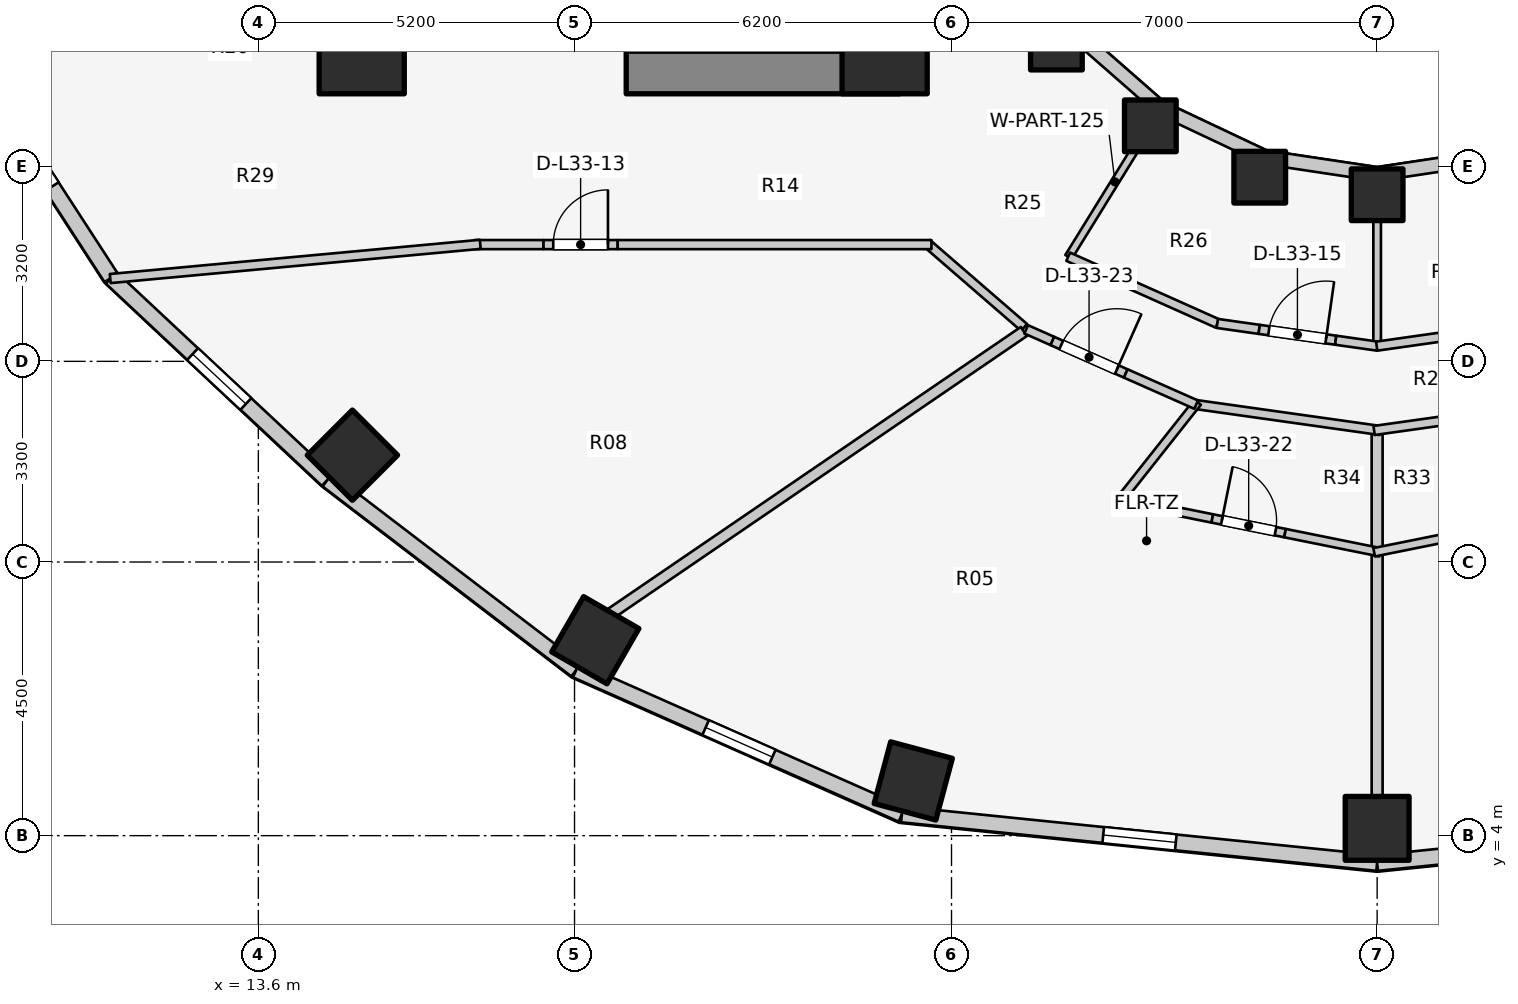
"""IFC4 building model, lengths in metres.
Left out: names, types, materials, properties, quantities, classifications, styles, units other than length and angle.
Written with IfcOpenShell. Run it as: python <this file> out.ifc"""

import sys

from ifc_helpers import new_model, si_unit, direction, frame, frame_2d, origin, origin_2d, place, context, subcontext, project, spatial, rectangle, extrude, element, fill, save


model = new_model("IFC4")
c1 = context("Model", 3, precision=1e-05, world=origin(), true_north=direction((0.0, 1.0)))
c2 = subcontext(c1, "Body", "Model", "MODEL_VIEW")
j1 = project(units=[si_unit("LENGTHUNIT", "METRE"), si_unit("PLANEANGLEUNIT", "RADIAN")], contexts=[c1])
p1 = place(None, origin())
s1 = spatial("IfcSite", under=j1, at=p1, CompositionType="ELEMENT")
p2 = place(p1, origin())
s2 = spatial("IfcBuilding", under=s1, at=p2, CompositionType="ELEMENT")
p3 = place(p2, frame((0.0, 0.0, 110.4)))
s3 = spatial("IfcBuildingStorey", under=s2, at=p3, CompositionType="ELEMENT", Elevation=110.4)
p4 = place(p3, frame((19.65, 16.55, 0.0), z_axis=(0.0, 0.0, 1.0), x_axis=(1.0, 0.0, 0.0)))
e1 = element("IfcWall", 1, at=p4, inside=s3, PredefinedType="SHEAR", context=c2, shape_type="SweptSolid", body=[
    extrude(rectangle(XDim=4.5, YDim=0.7, at=frame_2d((2.25, 0.0))), origin(), (0.0, 0.0, 1.0), 3.1),
])
for number, where, z_axis, x_axis in (
    (2, (15.3, 16.9, 0.0), (0.0, 0.0, 1.0), (1.0, 0.0, 0.0)),
    (3, (23.9, 16.9, 0.0), (0.0, 0.0, 1.0), (1.0, 0.0, 0.0)),
):
    element("IfcColumn", number, at=place(p3, frame(where, z_axis=z_axis, x_axis=x_axis)), inside=s3, PredefinedType="COLUMN", context=c2, shape_type="SweptSolid", body=[
        extrude(rectangle(XDim=1.4, YDim=1.4, at=origin_2d()), origin(), (0.0, 0.0, 1.0), 3.1),
    ])
p5 = place(p3, frame((26.725, 17.018, 0.0), z_axis=(0.0, 0.0, 1.0), x_axis=(1.0, 0.0, 0.0)))
e4 = element("IfcColumn", 4, at=p5, inside=s3, PredefinedType="COLUMN", context=c2, shape_type="SweptSolid", body=[
    extrude(rectangle(XDim=0.85, YDim=0.85, at=origin_2d()), origin(), (0.0, 0.0, 1.0), 3.1),
])
p6 = place(p3, frame((15.147, 10.257, 0.0), z_axis=(0.0, 0.0, 1.0), x_axis=(-0.707106781187, -0.707106781187, 0.0)))
e5 = element("IfcColumn", 5, at=p6, inside=s3, PredefinedType="COLUMN", context=c2, shape_type="SweptSolid", body=[
    extrude(rectangle(XDim=1.05, YDim=1.05, at=origin_2d()), origin(), (0.0, 0.0, 1.0), 3.1),
])
p7 = place(p3, frame((28.27, 15.673, 0.0), z_axis=(0.0, 0.0, 1.0), x_axis=(1.0, 0.0, 0.0)))
e6 = element("IfcColumn", 6, at=p7, inside=s3, PredefinedType="COLUMN", context=c2, shape_type="SweptSolid", body=[
    extrude(rectangle(XDim=0.85, YDim=0.85, at=origin_2d()), origin(), (0.0, 0.0, 1.0), 3.1),
])
p8 = place(p3, frame((19.142, 7.214, 0.0), z_axis=(0.0, 0.0, 1.0), x_axis=(-0.5, -0.866025403784, 0.0)))
e7 = element("IfcColumn", 7, at=p8, inside=s3, PredefinedType="COLUMN", context=c2, shape_type="SweptSolid", body=[
    extrude(rectangle(XDim=1.05, YDim=1.05, at=origin_2d()), origin(), (0.0, 0.0, 1.0), 3.1),
])
p9 = place(p3, frame((30.069, 14.828, 0.0), z_axis=(0.0, 0.0, 1.0), x_axis=(1.0, 0.0, 0.0)))
e8 = element("IfcColumn", 8, at=p9, inside=s3, PredefinedType="COLUMN", context=c2, shape_type="SweptSolid", body=[
    extrude(rectangle(XDim=0.85, YDim=0.85, at=origin_2d()), origin(), (0.0, 0.0, 1.0), 3.1),
])
p10 = place(p3, frame((24.371, 4.9, 0.0), z_axis=(0.0, 0.0, 1.0), x_axis=(-0.258819045103, -0.965925826289, 0.0)))
e9 = element("IfcColumn", 9, at=p10, inside=s3, PredefinedType="COLUMN", context=c2, shape_type="SweptSolid", body=[
    extrude(rectangle(XDim=1.05, YDim=1.05, at=origin_2d()), origin(), (0.0, 0.0, 1.0), 3.1),
])
p11 = place(p3, frame((32.0, 14.54, 0.0), z_axis=(0.0, 0.0, 1.0), x_axis=(1.0, 0.0, 0.0)))
e10 = element("IfcColumn", 10, at=p11, inside=s3, PredefinedType="COLUMN", context=c2, shape_type="SweptSolid", body=[
    extrude(rectangle(XDim=0.85, YDim=0.85, at=origin_2d()), origin(), (0.0, 0.0, 1.0), 3.1),
])
p12 = place(p3, frame((32.0, 4.12, 0.0), z_axis=(0.0, 0.0, 1.0), x_axis=(0.0, -1.0, 0.0)))
e11 = element("IfcColumn", 11, at=p12, inside=s3, PredefinedType="COLUMN", context=c2, shape_type="SweptSolid", body=[
    extrude(rectangle(XDim=1.05, YDim=1.05, at=origin_2d()), origin(), (0.0, 0.0, 1.0), 3.1),
])
p13 = place(p3, frame((26.965, 17.258, 0.0), z_axis=(0.0, 0.0, 1.0), x_axis=(0.752576694707, -0.658504607869, 0.0)))
e12 = element("IfcWall", 12, at=p13, inside=s3, PredefinedType="STANDARD", context=c2, shape_type="SweptSolid", body=[
    extrude(rectangle(XDim=1.959, YDim=0.23, at=frame_2d((0.98, 0.0))), origin(), (0.0, 0.0, 1.0), 1.22),
])
p14 = place(p3, frame((28.44, 15.968, 0.0), z_axis=(0.0, 0.0, 1.0), x_axis=(0.904179699603, -0.427152280606, 0.0)))
e13 = element("IfcWall", 13, at=p14, inside=s3, PredefinedType="STANDARD", context=c2, shape_type="SweptSolid", body=[
    extrude(rectangle(XDim=1.899, YDim=0.23, at=frame_2d((0.95, 0.0))), origin(), (0.0, 0.0, 1.0), 1.22),
])
for number, where, z_axis, x_axis in (
    (14, (30.157, 15.157, 0.0), (0.0, 0.0, 1.0), (0.989, -0.149, 0.0)),
    (15, (32.0, 14.88, 0.0), (0.0, 0.0, 1.0), (0.989, 0.149, 0.0)),
):
    element("IfcWall", number, at=place(p3, frame(where, z_axis=z_axis, x_axis=x_axis)), inside=s3, PredefinedType="STANDARD", context=c2, shape_type="SweptSolid", body=[
        extrude(rectangle(XDim=1.864, YDim=0.23, at=frame_2d((0.932, 0.0))), origin(), (0.0, 0.0, 1.0), 1.22),
    ])
p15 = place(p3, frame((8.578, 17.181, 0.0), z_axis=(0.0, 0.0, 1.0), x_axis=(0.544388392991, -0.838833283541, 0.0)))
e16 = element("IfcWall", 16, at=p15, inside=s3, PredefinedType="STANDARD", context=c2, shape_type="SweptSolid", body=[
    extrude(rectangle(XDim=4.778, YDim=0.26, at=frame_2d((2.389, 0.0))), origin(), (0.0, 0.0, 1.0), 1.22),
])
p16 = place(p15, frame((1.789, 0.0, 0.15)))
e17 = element("IfcOpeningElement", 17, at=p16, cuts=e16, PredefinedType="OPENING", context=c2, shape_type="SweptSolid", body=[
    extrude(rectangle(XDim=1.2, YDim=0.9, at=frame_2d((0.6, 0.45))), frame((0.0, 0.14, 0.0), z_axis=(0.0, -1.0, 0.0), x_axis=(1.0, 0.0, 0.0)), (0.0, 0.0, 1.0), 0.28),
])
p17 = place(p3, frame((11.179, 13.173, 0.0), z_axis=(0.0, 0.0, 1.0), x_axis=(0.730162452258, -0.68327358599, 0.0)))
e18 = element("IfcWall", 18, at=p17, inside=s3, PredefinedType="STANDARD", context=c2, shape_type="SweptSolid", body=[
    extrude(rectangle(XDim=4.868, YDim=0.26, at=frame_2d((2.434, 0.0))), origin(), (0.0, 0.0, 1.0), 1.22),
])
p18 = place(p17, frame((1.834, 0.0, 0.15)))
e19 = element("IfcOpeningElement", 19, at=p18, cuts=e18, PredefinedType="OPENING", context=c2, shape_type="SweptSolid", body=[
    extrude(rectangle(XDim=1.2, YDim=0.9, at=frame_2d((0.6, 0.45))), frame((0.0, 0.14, 0.0), z_axis=(0.0, -1.0, 0.0), x_axis=(1.0, 0.0, 0.0)), (0.0, 0.0, 1.0), 0.28),
])
p19 = place(p3, frame((14.734, 9.847, 0.0), z_axis=(0.0, 0.0, 1.0), x_axis=(0.794809810864, -0.606858603427, 0.0)))
e20 = element("IfcWall", 20, at=p19, inside=s3, PredefinedType="STANDARD", context=c2, shape_type="SweptSolid", body=[
    extrude(rectangle(XDim=5.149, YDim=0.26, at=frame_2d((2.575, 0.0))), origin(), (0.0, 0.0, 1.0), 1.22),
])
p20 = place(p3, frame((18.827, 6.722, 0.0), z_axis=(0.0, 0.0, 1.0), x_axis=(0.914336605747, -0.404955023911, 0.0)))
e21 = element("IfcWall", 21, at=p20, inside=s3, PredefinedType="STANDARD", context=c2, shape_type="SweptSolid", body=[
    extrude(rectangle(XDim=5.859, YDim=0.26, at=frame_2d((2.929, 0.0))), origin(), (0.0, 0.0, 1.0), 1.22),
])
p21 = place(p20, frame((2.329, 0.0, 0.15)))
e22 = element("IfcOpeningElement", 22, at=p21, cuts=e21, PredefinedType="OPENING", context=c2, shape_type="SweptSolid", body=[
    extrude(rectangle(XDim=1.2, YDim=0.9, at=frame_2d((0.6, 0.45))), frame((0.0, 0.14, 0.0), z_axis=(0.0, -1.0, 0.0), x_axis=(1.0, 0.0, 0.0)), (0.0, 0.0, 1.0), 0.28),
])
p22 = place(p3, frame((24.184, 4.349, 0.0), z_axis=(0.0, 0.0, 1.0), x_axis=(0.994821390558, -0.101638579726, 0.0)))
e23 = element("IfcWall", 23, at=p22, inside=s3, PredefinedType="STANDARD", context=c2, shape_type="SweptSolid", body=[
    extrude(rectangle(XDim=7.857, YDim=0.26, at=frame_2d((3.929, 0.0))), origin(), (0.0, 0.0, 1.0), 1.22),
])
p23 = place(p22, frame((3.329, 0.0, 0.15)))
e24 = element("IfcOpeningElement", 24, at=p23, cuts=e23, PredefinedType="OPENING", context=c2, shape_type="SweptSolid", body=[
    extrude(rectangle(XDim=1.2, YDim=0.9, at=frame_2d((0.6, 0.45))), frame((0.0, 0.14, 0.0), z_axis=(0.0, -1.0, 0.0), x_axis=(1.0, 0.0, 0.0)), (0.0, 0.0, 1.0), 0.28),
])
p24 = place(p3, frame((32.0, 3.551, 0.0), z_axis=(0.0, 0.0, 1.0), x_axis=(0.994821390558, 0.101638579726, 0.0)))
e25 = element("IfcWall", 25, at=p24, inside=s3, PredefinedType="STANDARD", context=c2, shape_type="SweptSolid", body=[
    extrude(rectangle(XDim=7.857, YDim=0.26, at=frame_2d((3.929, 0.0))), origin(), (0.0, 0.0, 1.0), 1.22),
])
p25 = place(p24, frame((3.329, 0.0, 0.15)))
e26 = element("IfcOpeningElement", 26, at=p25, cuts=e25, PredefinedType="OPENING", context=c2, shape_type="SweptSolid", body=[
    extrude(rectangle(XDim=1.2, YDim=0.9, at=frame_2d((0.6, 0.45))), frame((0.0, 0.14, 0.0), z_axis=(0.0, -1.0, 0.0), x_axis=(1.0, 0.0, 0.0)), (0.0, 0.0, 1.0), 0.28),
])
p26 = place(p3, frame((26.193, 12.358, 0.0), z_axis=(0.0, 0.0, 1.0), x_axis=(-0.756055312247, 0.654507727092, 0.0)))
e27 = element("IfcWall", 27, at=p26, inside=s3, PredefinedType="PARTITIONING", context=c2, shape_type="SweptSolid", body=[
    extrude(rectangle(XDim=2.111, YDim=0.15, at=frame_2d((1.055, 0.0))), origin(), (0.0, 0.0, 1.0), 1.22),
])
p27 = place(p3, frame((17.15, 13.72, 0.0), z_axis=(0.0, 0.0, 1.0), x_axis=(1.0, 0.0, 0.0)))
e28 = element("IfcWall", 28, at=p27, inside=s3, PredefinedType="PARTITIONING", context=c2, shape_type="SweptSolid", body=[
    extrude(rectangle(XDim=1.14, YDim=0.15, at=frame_2d((0.57, 0.0))), origin(), (0.0, 0.0, 1.0), 2.575),
])
p28 = place(p3, frame((18.29, 13.72, 0.0), z_axis=(0.0, 0.0, 1.0), x_axis=(1.0, 0.0, 0.0)))
e29 = element("IfcWall", 29, at=p28, inside=s3, PredefinedType="PARTITIONING", context=c2, shape_type="SweptSolid", body=[
    extrude(rectangle(XDim=1.22, YDim=0.15, at=frame_2d((0.61, 0.0))), origin(), (0.0, 0.0, 1.0), 2.575),
])
p29 = place(p28, frame((0.16, 0.0, 0.0)))
e30 = element("IfcOpeningElement", 30, at=p29, cuts=e29, PredefinedType="OPENING", context=c2, shape_type="SweptSolid", body=[
    extrude(rectangle(XDim=0.9, YDim=2.1, at=frame_2d((0.45, 1.05))), frame((0.0, 0.085, 0.0), z_axis=(0.0, -1.0, 0.0), x_axis=(1.0, 0.0, 0.0)), (0.0, 0.0, 1.0), 0.17),
])
p30 = place(p3, frame((19.51, 13.72, 0.0), z_axis=(0.0, 0.0, 1.0), x_axis=(1.0, 0.0, 0.0)))
e31 = element("IfcWall", 31, at=p30, inside=s3, PredefinedType="PARTITIONING", context=c2, shape_type="SweptSolid", body=[
    extrude(rectangle(XDim=5.16, YDim=0.15, at=frame_2d((2.58, 0.0))), origin(), (0.0, 0.0, 1.0), 1.22),
])
p31 = place(p3, frame((17.25, 13.725, 0.0), z_axis=(0.0, 0.0, 1.0), x_axis=(-0.995748209098, -0.092116795851, 0.0)))
e32 = element("IfcWall", 32, at=p31, inside=s3, PredefinedType="PARTITIONING", context=c2, shape_type="SweptSolid", body=[
    extrude(rectangle(XDim=6.112, YDim=0.15, at=frame_2d((3.056, 0.0))), origin(), (0.0, 0.0, 1.0), 1.22),
])
p32 = place(p3, frame((28.45, 15.985, 0.0), z_axis=(0.0, 0.0, 1.0), x_axis=(-0.525627246902, -0.850714991824, 0.0)))
e33 = element("IfcWall", 33, at=p32, inside=s3, PredefinedType="PARTITIONING", context=c2, shape_type="SweptSolid", body=[
    extrude(rectangle(XDim=2.901, YDim=0.125, at=frame_2d((1.451, 0.0))), origin(), (0.0, 0.0, 1.0), 1.22),
])
p33 = place(p3, frame((32.0, 14.9, 0.0), z_axis=(0.0, 0.0, 1.0), x_axis=(0.0, -1.0, 0.0)))
e34 = element("IfcWall", 34, at=p33, inside=s3, PredefinedType="PARTITIONING", context=c2, shape_type="SweptSolid", body=[
    extrude(rectangle(XDim=2.85, YDim=0.125, at=frame_2d((1.425, 0.0))), origin(), (0.0, 0.0, 1.0), 1.22),
])
p34 = place(p3, frame((26.919, 13.521, 0.0), z_axis=(0.0, 0.0, 1.0), x_axis=(0.912888568324, -0.408208845842, 0.0)))
e35 = element("IfcWall", 35, at=p34, inside=s3, PredefinedType="PARTITIONING", context=c2, shape_type="SweptSolid", body=[
    extrude(rectangle(XDim=2.69, YDim=0.15, at=frame_2d((1.345, 0.0))), origin(), (0.0, 0.0, 1.0), 1.22),
])
p35 = place(p3, frame((29.371, 12.424, 0.0), z_axis=(0.0, 0.0, 1.0), x_axis=(0.990110185172, -0.1402919143, 0.0)))
e36 = element("IfcWall", 36, at=p35, inside=s3, PredefinedType="PARTITIONING", context=c2, shape_type="SweptSolid", body=[
    extrude(rectangle(XDim=0.696, YDim=0.15, at=frame_2d((0.348, 0.0))), origin(), (0.0, 0.0, 1.0), 2.575),
])
p36 = place(p3, frame((30.061, 12.326, 0.0), z_axis=(0.0, 0.0, 1.0), x_axis=(0.990102710588, -0.140344656064, 0.0)))
e37 = element("IfcWall", 37, at=p36, inside=s3, PredefinedType="PARTITIONING", context=c2, shape_type="SweptSolid", body=[
    extrude(rectangle(XDim=1.27, YDim=0.15, at=frame_2d((0.635, 0.0))), origin(), (0.0, 0.0, 1.0), 2.575),
])
p37 = place(p36, frame((0.16, 0.0, 0.0)))
e38 = element("IfcOpeningElement", 38, at=p37, cuts=e37, PredefinedType="OPENING", context=c2, shape_type="SweptSolid", body=[
    extrude(rectangle(XDim=0.95, YDim=2.1, at=frame_2d((0.475, 1.05))), frame((0.0, 0.085, 0.0), z_axis=(0.0, -1.0, 0.0), x_axis=(1.0, 0.0, 0.0)), (0.0, 0.0, 1.0), 0.17),
])
p38 = place(p3, frame((31.318, 12.148, 0.0), z_axis=(0.0, 0.0, 1.0), x_axis=(0.990110185172, -0.1402919143, 0.0)))
e39 = element("IfcWall", 39, at=p38, inside=s3, PredefinedType="PARTITIONING", context=c2, shape_type="SweptSolid", body=[
    extrude(rectangle(XDim=0.696, YDim=0.15, at=frame_2d((0.348, 0.0))), origin(), (0.0, 0.0, 1.0), 1.22),
])
p39 = place(p3, frame((31.993, 12.05, 0.0), z_axis=(0.0, 0.0, 1.0), x_axis=(0.990106619919, 0.140317073775, 0.0)))
e40 = element("IfcWall", 40, at=p39, inside=s3, PredefinedType="PARTITIONING", context=c2, shape_type="SweptSolid", body=[
    extrude(rectangle(XDim=2.662, YDim=0.15, at=frame_2d((1.331, 0.0))), origin(), (0.0, 0.0, 1.0), 1.22),
])
p40 = place(p3, frame((26.19, 12.291, 0.0), z_axis=(0.0, 0.0, 1.0), x_axis=(-0.825850521911, -0.563889098546, 0.0)))
e41 = element("IfcWall", 41, at=p40, inside=s3, PredefinedType="PARTITIONING", context=c2, shape_type="SweptSolid", body=[
    extrude(rectangle(XDim=8.228, YDim=0.18, at=frame_2d((4.114, 0.0))), origin(), (0.0, 0.0, 1.0), 1.22),
])
p41 = place(p3, frame((32.0, 10.615, 0.0), z_axis=(0.0, 0.0, 1.0), x_axis=(0.0, -1.0, 0.0)))
e42 = element("IfcWall", 42, at=p41, inside=s3, PredefinedType="PARTITIONING", context=c2, shape_type="SweptSolid", body=[
    extrude(rectangle(XDim=5.99, YDim=0.18, at=frame_2d((2.995, 0.0))), origin(), (0.0, 0.0, 1.0), 1.22),
])
p42 = place(p3, frame((28.966, 11.097, 0.0), z_axis=(0.0, 0.0, 1.0), x_axis=(0.990234434447, -0.139412211929, 0.0)))
e43 = element("IfcWall", 43, at=p42, inside=s3, PredefinedType="PARTITIONING", context=c2, shape_type="SweptSolid", body=[
    extrude(rectangle(XDim=3.114, YDim=0.15, at=frame_2d((1.557, 0.0))), origin(), (0.0, 0.0, 1.0), 1.22),
])
p43 = place(p3, frame((29.047, 11.129, 0.0), z_axis=(0.0, 0.0, 1.0), x_axis=(-0.620702944366, -0.784045824462, 0.0)))
e44 = element("IfcWall", 44, at=p43, inside=s3, PredefinedType="PLUMBINGWALL", context=c2, shape_type="SweptSolid", body=[
    extrude(rectangle(XDim=2.1, YDim=0.14, at=frame_2d((1.05, 0.0))), origin(), (0.0, 0.0, 1.0), 2.105),
])
p44 = place(p3, frame((27.725, 9.532, 0.0), z_axis=(0.0, 0.0, 1.0), x_axis=(0.980261572321, -0.197704956516, 0.0)))
e45 = element("IfcWall", 45, at=p44, inside=s3, PredefinedType="PLUMBINGWALL", context=c2, shape_type="SweptSolid", body=[
    extrude(rectangle(XDim=1.595, YDim=0.14, at=frame_2d((0.798, 0.0))), origin(), (0.0, 0.0, 1.0), 2.575),
])
p45 = place(p3, frame((29.289, 9.217, 0.0), z_axis=(0.0, 0.0, 1.0), x_axis=(0.980256050043, -0.197732335125, 0.0)))
e46 = element("IfcWall", 46, at=p45, inside=s3, PredefinedType="PLUMBINGWALL", context=c2, shape_type="SweptSolid", body=[
    extrude(rectangle(XDim=1.22, YDim=0.14, at=frame_2d((0.61, 0.0))), origin(), (0.0, 0.0, 1.0), 2.575),
])
p46 = place(p45, frame((0.16, 0.0, 0.0)))
e47 = element("IfcOpeningElement", 47, at=p46, cuts=e46, PredefinedType="OPENING", context=c2, shape_type="SweptSolid", body=[
    extrude(rectangle(XDim=0.9, YDim=2.1, at=frame_2d((0.45, 1.05))), frame((0.0, 0.08, 0.0), z_axis=(0.0, -1.0, 0.0), x_axis=(1.0, 0.0, 0.0)), (0.0, 0.0, 1.0), 0.16),
])
p47 = place(p3, frame((30.485, 8.975, 0.0), z_axis=(0.0, 0.0, 1.0), x_axis=(0.980291218326, -0.197557908657, 0.0)))
e48 = element("IfcWall", 48, at=p47, inside=s3, PredefinedType="PLUMBINGWALL", context=c2, shape_type="SweptSolid", body=[
    extrude(rectangle(XDim=1.595, YDim=0.14, at=frame_2d((0.798, 0.0))), origin(), (0.0, 0.0, 1.0), 1.22),
])
p48 = place(p3, frame((26.228, 12.326, 0.0), z_axis=(0.0, 0.0, 1.0), x_axis=(0.914387769504, -0.404839482983, 0.0)))
e49 = element("IfcWall", 49, at=p48, inside=s3, PredefinedType="PARTITIONING", context=c2, shape_type="SweptSolid", body=[
    extrude(rectangle(XDim=0.471, YDim=0.15, at=frame_2d((0.235, 0.0))), origin(), (0.0, 0.0, 1.0), 2.575),
])
p49 = place(p3, frame((26.659, 12.135, 0.0), z_axis=(0.0, 0.0, 1.0), x_axis=(0.914314172667, -0.405005671145, 0.0)))
e50 = element("IfcWall", 50, at=p49, inside=s3, PredefinedType="PARTITIONING", context=c2, shape_type="SweptSolid", body=[
    extrude(rectangle(XDim=1.32, YDim=0.15, at=frame_2d((0.66, 0.0))), origin(), (0.0, 0.0, 1.0), 2.16),
])
p50 = place(p49, frame((0.16, 0.0, 0.0)))
e51 = element("IfcOpeningElement", 51, at=p50, cuts=e50, PredefinedType="OPENING", context=c2, shape_type="SweptSolid", body=[
    extrude(rectangle(XDim=1.0, YDim=2.1, at=frame_2d((0.5, 1.05))), frame((0.0, 0.085, 0.0), z_axis=(0.0, -1.0, 0.0), x_axis=(1.0, 0.0, 0.0)), (0.0, 0.0, 1.0), 0.17),
])
p51 = place(p3, frame((27.866, 11.601, 0.0), z_axis=(0.0, 0.0, 1.0), x_axis=(0.914311660367, -0.405011342701, 0.0)))
e52 = element("IfcWall", 52, at=p51, inside=s3, PredefinedType="PARTITIONING", context=c2, shape_type="SweptSolid", body=[
    extrude(rectangle(XDim=1.267, YDim=0.15, at=frame_2d((0.633, 0.0))), origin(), (0.0, 0.0, 1.0), 1.22),
])
p52 = place(p3, frame((31.95, 10.663, 0.0), z_axis=(0.0, 0.0, 1.0), x_axis=(0.990234434447, 0.139412211929, 0.0)))
e53 = element("IfcWall", 53, at=p52, inside=s3, PredefinedType="PARTITIONING", context=c2, shape_type="SweptSolid", body=[
    extrude(rectangle(XDim=3.114, YDim=0.15, at=frame_2d((1.557, 0.0))), origin(), (0.0, 0.0, 1.0), 1.22),
])
p53 = place(p3, frame((31.951, 8.66, 0.0), z_axis=(0.0, 0.0, 1.0), x_axis=(0.980291218326, 0.197557908657, 0.0)))
e54 = element("IfcWall", 54, at=p53, inside=s3, PredefinedType="PLUMBINGWALL", context=c2, shape_type="SweptSolid", body=[
    extrude(rectangle(XDim=1.595, YDim=0.14, at=frame_2d((0.798, 0.0))), origin(), (0.0, 0.0, 1.0), 1.22),
])
p54 = place(p16, origin())
e55 = element("IfcWindow", 55, at=p54, inside=s3, PartitioningType="SINGLE_PANEL", PredefinedType="WINDOW", context=c2, shape_type="SweptSolid", body=[
    extrude(rectangle(XDim=1.2, YDim=0.9, at=frame_2d((0.6, 0.45))), frame((0.0, 0.03, 0.0), z_axis=(0.0, -1.0, 0.0), x_axis=(1.0, 0.0, 0.0)), (0.0, 0.0, 1.0), 0.06),
])
fill(e17, e55)
p55 = place(p18, origin())
e56 = element("IfcWindow", 56, at=p55, inside=s3, PartitioningType="SINGLE_PANEL", PredefinedType="WINDOW", context=c2, shape_type="SweptSolid", body=[
    extrude(rectangle(XDim=1.2, YDim=0.9, at=frame_2d((0.6, 0.45))), frame((0.0, 0.03, 0.0), z_axis=(0.0, -1.0, 0.0), x_axis=(1.0, 0.0, 0.0)), (0.0, 0.0, 1.0), 0.06),
])
fill(e19, e56)
p56 = place(p21, origin())
e57 = element("IfcWindow", 57, at=p56, inside=s3, PartitioningType="SINGLE_PANEL", PredefinedType="WINDOW", context=c2, shape_type="SweptSolid", body=[
    extrude(rectangle(XDim=1.2, YDim=0.9, at=frame_2d((0.6, 0.45))), frame((0.0, 0.03, 0.0), z_axis=(0.0, -1.0, 0.0), x_axis=(1.0, 0.0, 0.0)), (0.0, 0.0, 1.0), 0.06),
])
fill(e22, e57)
p57 = place(p23, origin())
e58 = element("IfcWindow", 58, at=p57, inside=s3, PartitioningType="SINGLE_PANEL", PredefinedType="WINDOW", context=c2, shape_type="SweptSolid", body=[
    extrude(rectangle(XDim=1.2, YDim=0.9, at=frame_2d((0.6, 0.45))), frame((0.0, 0.03, 0.0), z_axis=(0.0, -1.0, 0.0), x_axis=(1.0, 0.0, 0.0)), (0.0, 0.0, 1.0), 0.06),
])
fill(e24, e58)
p58 = place(p29, origin())
e59 = element("IfcDoor", 59, at=p58, inside=s3, OperationType="SINGLE_SWING_RIGHT", PredefinedType="DOOR", context=c2, shape_type="SweptSolid", body=[
    extrude(rectangle(XDim=0.9, YDim=2.1, at=frame_2d((0.45, 1.05))), frame((0.0, 0.025, 0.0), z_axis=(0.0, -1.0, 0.0), x_axis=(1.0, 0.0, 0.0)), (0.0, 0.0, 1.0), 0.05),
])
fill(e30, e59)
p59 = place(p37, origin())
e60 = element("IfcDoor", 60, at=p59, inside=s3, OperationType="SINGLE_SWING_RIGHT", PredefinedType="DOOR", context=c2, shape_type="SweptSolid", body=[
    extrude(rectangle(XDim=0.95, YDim=2.1, at=frame_2d((0.475, 1.05))), frame((0.0, 0.025, 0.0), z_axis=(0.0, -1.0, 0.0), x_axis=(1.0, 0.0, 0.0)), (0.0, 0.0, 1.0), 0.05),
])
fill(e38, e60)
p60 = place(p46, origin())
e61 = element("IfcDoor", 61, at=p60, inside=s3, OperationType="SINGLE_SWING_LEFT", PredefinedType="DOOR", context=c2, shape_type="SweptSolid", body=[
    extrude(rectangle(XDim=0.9, YDim=2.1, at=frame_2d((0.45, 1.05))), frame((0.0, 0.025, 0.0), z_axis=(0.0, -1.0, 0.0), x_axis=(1.0, 0.0, 0.0)), (0.0, 0.0, 1.0), 0.05),
])
fill(e47, e61)
p61 = place(p50, origin())
e62 = element("IfcDoor", 62, at=p61, inside=s3, OperationType="SINGLE_SWING_RIGHT", PredefinedType="DOOR", context=c2, shape_type="SweptSolid", body=[
    extrude(rectangle(XDim=1.0, YDim=2.1, at=frame_2d((0.5, 1.05))), frame((0.0, 0.025, 0.0), z_axis=(0.0, -1.0, 0.0), x_axis=(1.0, 0.0, 0.0)), (0.0, 0.0, 1.0), 0.05),
])
fill(e51, e62)
save(model, sys.argv[1])
